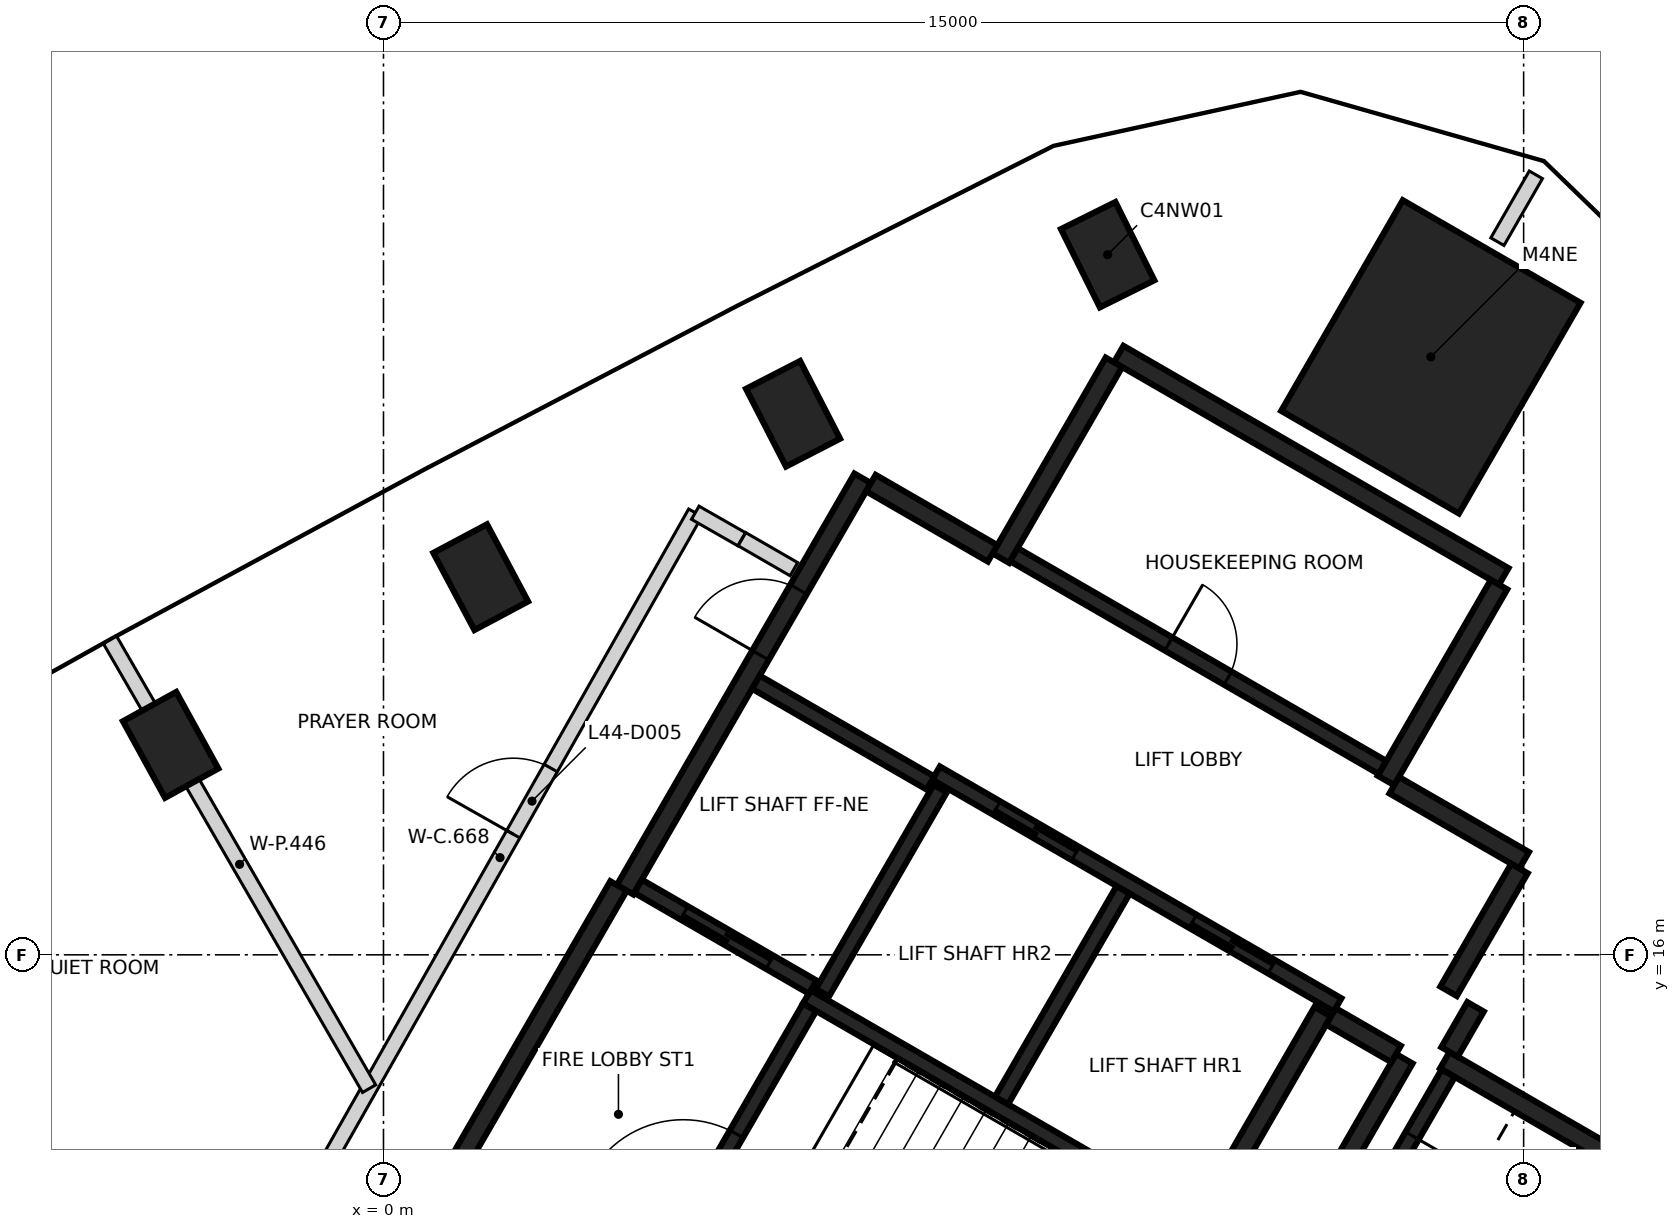
"""IFC4 building model, lengths in metres.
Left out: names, types, materials, properties, quantities, classifications, styles, units other than length and angle.
Written with IfcOpenShell. Run it as: python <this file> out.ifc"""

import sys

from ifc_helpers import new_model, si_unit, direction, frame, frame_2d, origin, origin_2d, place, context, subcontext, project, spatial, rectangle, extrude, element, fill, save


model = new_model("IFC4")
c1 = context("Model", 3, precision=1e-05, world=origin(), true_north=direction((0.0, 1.0)))
c2 = subcontext(c1, "Body", "Model", "MODEL_VIEW")
j1 = project(units=[si_unit("LENGTHUNIT", "METRE"), si_unit("PLANEANGLEUNIT", "RADIAN")], contexts=[c1])
p1 = place(None, origin())
s1 = spatial("IfcSite", under=j1, at=p1, CompositionType="ELEMENT")
p2 = place(p1, origin())
s2 = spatial("IfcBuilding", under=s1, at=p2, CompositionType="ELEMENT")
p3 = place(p2, frame((0.0, 0.0, 179.2)))
s3 = spatial("IfcBuildingStorey", under=s2, at=p3, CompositionType="ELEMENT", Elevation=179.2)
for number, where, z_axis, x_axis in (
    (1, (9.527, 25.211, -0.35), (0.0, 0.0, 1.0), (-0.445, 0.895, 0.0)),
    (2, (5.388, 23.118, -0.35), (0.0, 0.0, 1.0), (-0.458, 0.889, 0.0)),
    (3, (1.279, 20.968, -0.35), (0.0, 0.0, 1.0), (-0.47, 0.883, 0.0)),
    (4, (-2.8, 18.762, -0.35), (0.0, 0.0, 1.0), (-0.482, 0.876, 0.0)),
):
    element("IfcColumn", number, at=place(p3, frame(where, z_axis=z_axis, x_axis=x_axis)), inside=s3, PredefinedType="COLUMN", context=c2, shape_type="SweptSolid", body=[
        extrude(rectangle(XDim=1.15, YDim=0.8, at=origin_2d()), origin(), (0.0, 0.0, 1.0), 3.6),
    ])
p4 = place(p3, frame((13.78, 23.867, -0.35), z_axis=(0.0, 0.0, 1.0), x_axis=(0.5, 0.866025403784, 0.0)))
e5 = element("IfcColumn", 5, at=p4, inside=s3, PredefinedType="COLUMN", context=c2, shape_type="SweptSolid", body=[
    extrude(rectangle(XDim=3.2, YDim=2.7, at=origin_2d()), origin(), (0.0, 0.0, 1.0), 3.6),
])
p5 = place(p3, frame((3.179, 16.856, 0.0), z_axis=(0.0, 0.0, 1.0), x_axis=(0.500004234368, 0.866022959057, 0.0)))
e6 = element("IfcWall", 6, at=p5, inside=s3, PredefinedType="SHEAR", context=c2, shape_type="SweptSolid", body=[
    extrude(rectangle(XDim=6.25, YDim=0.25, at=frame_2d((3.125, 0.0))), origin(), (0.0, 0.0, 1.0), 3.25),
])
p6 = place(p5, frame((3.563, 0.0, 0.0)))
e7 = element("IfcOpeningElement", 7, at=p6, cuts=e6, PredefinedType="OPENING", context=c2, shape_type="SweptSolid", body=[
    extrude(rectangle(XDim=1.0, YDim=2.1, at=frame_2d((0.5, 1.05))), frame((0.0, 0.135, 0.0), z_axis=(0.0, -1.0, 0.0), x_axis=(1.0, 0.0, 0.0)), (0.0, 0.0, 1.0), 0.27),
])
p7 = place(p3, frame((9.673, 23.903, 0.0), z_axis=(0.0, 0.0, 1.0), x_axis=(0.86603616409, -0.499981362141, 0.0)))
e8 = element("IfcWall", 8, at=p7, inside=s3, PredefinedType="SHEAR", context=c2, shape_type="SweptSolid", body=[
    extrude(rectangle(XDim=5.85, YDim=0.25, at=frame_2d((2.925, 0.0))), origin(), (0.0, 0.0, 1.0), 3.25),
])
p8 = place(p3, frame((0.48, 12.381, 0.0), z_axis=(0.0, 0.0, 1.0), x_axis=(0.49999885962, 0.866026062182, 0.0)))
e9 = element("IfcWall", 9, at=p8, inside=s3, PredefinedType="SHEAR", context=c2, shape_type="SweptSolid", body=[
    extrude(rectangle(XDim=5.225, YDim=0.25, at=frame_2d((2.612, 0.0))), origin(), (0.0, 0.0, 1.0), 3.25),
])
p9 = place(p3, frame((12.357, 15.252, 0.0), z_axis=(0.0, 0.0, 1.0), x_axis=(-0.500028443584, -0.866008981251, 0.0)))
e10 = element("IfcWall", 10, at=p9, inside=s3, PredefinedType="SHEAR", context=c2, shape_type="SweptSolid", body=[
    extrude(rectangle(XDim=3.2, YDim=0.25, at=frame_2d((1.6, 0.0))), origin(), (0.0, 0.0, 1.0), 3.25),
])
for number, where, z_axis, x_axis in (
    (11, (8.123, 21.219, 0.0), (0.0, 0.0, 1.0), (0.5, 0.866, 0.0)),
    (12, (14.676, 20.87, 0.0), (0.0, 0.0, 1.0), (-0.5, -0.866, 0.0)),
):
    element("IfcWall", number, at=place(p3, frame(where, z_axis=z_axis, x_axis=x_axis)), inside=s3, PredefinedType="SHEAR", context=c2, shape_type="SweptSolid", body=[
        extrude(rectangle(XDim=2.975, YDim=0.25, at=frame_2d((1.487, 0.0))), origin(), (0.0, 0.0, 1.0), 3.25),
    ])
p10 = place(p3, frame((13.963, 14.614, 0.0), z_axis=(0.0, 0.0, 1.0), x_axis=(0.866042235819, -0.499970844928, 0.0)))
e13 = element("IfcWall", 13, at=p10, inside=s3, PredefinedType="SHEAR", context=c2, shape_type="SweptSolid", body=[
    extrude(rectangle(XDim=2.865, YDim=0.25, at=frame_2d((1.432, 0.0))), origin(), (0.0, 0.0, 1.0), 3.25),
])
p11 = place(p3, frame((11.888, 11.961, 0.0), z_axis=(0.0, 0.0, 1.0), x_axis=(0.500003324108, 0.866023484601, 0.0)))
e14 = element("IfcWall", 14, at=p11, inside=s3, PredefinedType="SHEAR", context=c2, shape_type="SweptSolid", body=[
    extrude(rectangle(XDim=3.085, YDim=0.25, at=frame_2d((1.542, 0.0))), origin(), (0.0, 0.0, 1.0), 3.25),
])
p12 = place(p3, frame((13.297, 18.231, 0.0), z_axis=(0.0, 0.0, 1.0), x_axis=(0.866043531843, -0.499968599967, 0.0)))
e15 = element("IfcWall", 15, at=p12, inside=s3, PredefinedType="SHEAR", context=c2, shape_type="SweptSolid", body=[
    extrude(rectangle(XDim=1.975, YDim=0.25, at=frame_2d((0.987, 0.0))), origin(), (0.0, 0.0, 1.0), 3.25),
])
p13 = place(p3, frame((6.413, 22.206, 0.0), z_axis=(0.0, 0.0, 1.0), x_axis=(0.866016279763, -0.500015802937, 0.0)))
e16 = element("IfcWall", 16, at=p13, inside=s3, PredefinedType="SHEAR", context=c2, shape_type="SweptSolid", body=[
    extrude(rectangle(XDim=1.849, YDim=0.25, at=frame_2d((0.925, 0.0))), origin(), (0.0, 0.0, 1.0), 3.25),
])
p14 = place(p3, frame((14.945, 17.135, 0.0), z_axis=(0.0, 0.0, 1.0), x_axis=(-0.499983108224, -0.866035156036, 0.0)))
e17 = element("IfcWall", 17, at=p14, inside=s3, PredefinedType="SHEAR", context=c2, shape_type="SweptSolid", body=[
    extrude(rectangle(XDim=1.865, YDim=0.25, at=frame_2d((0.932, 0.0))), origin(), (0.0, 0.0, 1.0), 3.25),
])
p15 = place(p3, frame((13.322, 14.695, 0.0), z_axis=(0.0, 0.0, 1.0), x_axis=(-0.866017078145, 0.500014420154, 0.0)))
e18 = element("IfcWall", 18, at=p15, inside=s3, PredefinedType="SHEAR", context=c2, shape_type="SweptSolid", body=[
    extrude(rectangle(XDim=0.989, YDim=0.25, at=frame_2d((0.495, 0.0))), origin(), (0.0, 0.0, 1.0), 3.25),
])
p16 = place(p3, frame((14.368, 15.315, 0.0), z_axis=(0.0, 0.0, 1.0), x_axis=(-0.499897359611, -0.866084655132, 0.0)))
e19 = element("IfcWall", 19, at=p16, inside=s3, PredefinedType="SHEAR", context=c2, shape_type="SweptSolid", body=[
    extrude(rectangle(XDim=0.685, YDim=0.25, at=frame_2d((0.342, 0.0))), origin(), (0.0, 0.0, 1.0), 3.25),
])
p17 = place(p3, frame((12.552, 15.342, 0.0), z_axis=(0.0, 0.0, 1.0), x_axis=(-0.866030299012, 0.499991521122, 0.0)))
e20 = element("IfcWall", 20, at=p17, inside=s3, PredefinedType="SHEAR", context=c2, shape_type="SweptSolid", body=[
    extrude(rectangle(XDim=6.1, YDim=0.2, at=frame_2d((3.05, 0.0))), origin(), (0.0, 0.0, 1.0), 3.25),
])
p18 = place(p17, frame((1.0, 0.0, 0.0)))
e21 = element("IfcOpeningElement", 21, at=p18, cuts=e20, PredefinedType="OPENING", context=c2, shape_type="SweptSolid", body=[
    extrude(rectangle(XDim=1.2, YDim=2.1, at=frame_2d((0.6, 1.05))), frame((0.0, 0.11, 0.0), z_axis=(0.0, -1.0, 0.0), x_axis=(1.0, 0.0, 0.0)), (0.0, 0.0, 1.0), 0.22),
])
p19 = place(p17, frame((3.982, 0.0, 0.0)))
e22 = element("IfcOpeningElement", 22, at=p19, cuts=e20, PredefinedType="OPENING", context=c2, shape_type="SweptSolid", body=[
    extrude(rectangle(XDim=1.2, YDim=2.1, at=frame_2d((0.6, 1.05))), frame((0.0, 0.11, 0.0), z_axis=(0.0, -1.0, 0.0), x_axis=(1.0, 0.0, 0.0)), (0.0, 0.0, 1.0), 0.22),
])
p20 = place(p3, frame((10.636, 12.521, 0.0), z_axis=(0.0, 0.0, 1.0), x_axis=(-0.866013252188, 0.500021046592, 0.0)))
e23 = element("IfcWall", 23, at=p20, inside=s3, PredefinedType="SHEAR", context=c2, shape_type="SweptSolid", body=[
    extrude(rectangle(XDim=5.851, YDim=0.2, at=frame_2d((2.925, 0.0))), origin(), (0.0, 0.0, 1.0), 3.25),
])
p21 = place(p3, frame((8.294, 21.264, 0.0), z_axis=(0.0, 0.0, 1.0), x_axis=(0.866025812541, -0.499999292012, 0.0)))
e24 = element("IfcWall", 24, at=p21, inside=s3, PredefinedType="SHEAR", context=c2, shape_type="SweptSolid", body=[
    extrude(rectangle(XDim=5.598, YDim=0.2, at=frame_2d((2.799, 0.0))), origin(), (0.0, 0.0, 1.0), 3.25),
])
p22 = place(p21, frame((2.349, 0.0, 0.0)))
e25 = element("IfcOpeningElement", 25, at=p22, cuts=e24, PredefinedType="OPENING", context=c2, shape_type="SweptSolid", body=[
    extrude(rectangle(XDim=0.9, YDim=2.1, at=frame_2d((0.45, 1.05))), frame((0.0, 0.11, 0.0), z_axis=(0.0, -1.0, 0.0), x_axis=(1.0, 0.0, 0.0)), (0.0, 0.0, 1.0), 0.22),
])
p23 = place(p3, frame((3.057, 10.895, 0.0), z_axis=(0.0, 0.0, 1.0), x_axis=(0.500027839223, 0.866009330205, 0.0)))
e26 = element("IfcWall", 26, at=p23, inside=s3, PredefinedType="SHEAR", context=c2, shape_type="SweptSolid", body=[
    extrude(rectangle(XDim=5.098, YDim=0.2, at=frame_2d((2.549, 0.0))), origin(), (0.0, 0.0, 1.0), 3.25),
])
p24 = place(p23, frame((1.774, 0.0, 0.0)))
e27 = element("IfcOpeningElement", 27, at=p24, cuts=e26, PredefinedType="OPENING", context=c2, shape_type="SweptSolid", body=[
    extrude(rectangle(XDim=1.4, YDim=2.1, at=frame_2d((0.7, 1.05))), frame((0.0, 0.11, 0.0), z_axis=(0.0, -1.0, 0.0), x_axis=(1.0, 0.0, 0.0)), (0.0, 0.0, 1.0), 0.22),
])
p25 = place(p3, frame((8.132, 14.084, 0.0), z_axis=(0.0, 0.0, 1.0), x_axis=(0.500030834389, 0.86600760081, 0.0)))
e28 = element("IfcWall", 28, at=p25, inside=s3, PredefinedType="SHEAR", context=c2, shape_type="SweptSolid", body=[
    extrude(rectangle(XDim=3.198, YDim=0.2, at=frame_2d((1.599, 0.0))), origin(), (0.0, 0.0, 1.0), 3.25),
])
p26 = place(p3, frame((14.008, 14.442, 0.0), z_axis=(0.0, 0.0, 1.0), x_axis=(-0.499986818241, -0.866033014143, 0.0)))
e29 = element("IfcWall", 29, at=p26, inside=s3, PredefinedType="SHEAR", context=c2, shape_type="SweptSolid", body=[
    extrude(rectangle(XDim=2.798, YDim=0.2, at=frame_2d((1.399, 0.0))), origin(), (0.0, 0.0, 1.0), 3.25),
])
p27 = place(p26, frame((0.949, 0.0, 0.0)))
e30 = element("IfcOpeningElement", 30, at=p27, cuts=e29, PredefinedType="OPENING", context=c2, shape_type="SweptSolid", body=[
    extrude(rectangle(XDim=0.9, YDim=2.1, at=frame_2d((0.45, 1.05))), frame((0.0, 0.11, 0.0), z_axis=(0.0, -1.0, 0.0), x_axis=(1.0, 0.0, 0.0)), (0.0, 0.0, 1.0), 0.22),
])
p28 = place(p3, frame((7.324, 18.187, 0.0), z_axis=(0.0, 0.0, 1.0), x_axis=(-0.499967891604, -0.866043940782, 0.0)))
e31 = element("IfcWall", 31, at=p28, inside=s3, PredefinedType="SHEAR", context=c2, shape_type="SweptSolid", body=[
    extrude(rectangle(XDim=3.1, YDim=0.2, at=frame_2d((1.55, 0.0))), origin(), (0.0, 0.0, 1.0), 3.25),
])
p29 = place(p3, frame((5.646, 15.576, 0.0), z_axis=(0.0, 0.0, 1.0), x_axis=(-0.866018407898, 0.500012117035, 0.0)))
e32 = element("IfcWall", 32, at=p29, inside=s3, PredefinedType="SHEAR", context=c2, shape_type="SweptSolid", body=[
    extrude(rectangle(XDim=2.651, YDim=0.2, at=frame_2d((1.325, 0.0))), origin(), (0.0, 0.0, 1.0), 3.25),
])
p30 = place(p29, frame((0.652, 0.0, 0.0)))
e33 = element("IfcOpeningElement", 33, at=p30, cuts=e32, PredefinedType="OPENING", context=c2, shape_type="SweptSolid", body=[
    extrude(rectangle(XDim=1.3, YDim=2.1, at=frame_2d((0.65, 1.05))), frame((0.0, 0.11, 0.0), z_axis=(0.0, -1.0, 0.0), x_axis=(1.0, 0.0, 0.0)), (0.0, 0.0, 1.0), 0.22),
])
p31 = place(p3, frame((7.196, 18.26, 0.0), z_axis=(0.0, 0.0, 1.0), x_axis=(-0.866018407898, 0.500012117035, 0.0)))
e34 = element("IfcWall", 34, at=p31, inside=s3, PredefinedType="SHEAR", context=c2, shape_type="SweptSolid", body=[
    extrude(rectangle(XDim=2.651, YDim=0.2, at=frame_2d((1.325, 0.0))), origin(), (0.0, 0.0, 1.0), 3.25),
])
p32 = place(p3, frame((-1.035, 12.742, 0.0), z_axis=(0.0, 0.0, 1.0), x_axis=(0.49267817774, 0.870211591039, 0.0)))
e35 = element("IfcWall", 35, at=p32, inside=s3, PredefinedType="PARTITIONING", context=c2, shape_type="SweptSolid", body=[
    extrude(rectangle(XDim=10.427, YDim=0.2, at=frame_2d((5.214, 0.0))), origin(), (0.0, 0.0, 1.0), 3.25),
])
p33 = place(p32, frame((5.568, 0.0, 0.0)))
e36 = element("IfcOpeningElement", 36, at=p33, cuts=e35, PredefinedType="OPENING", context=c2, shape_type="SweptSolid", body=[
    extrude(rectangle(XDim=1.0, YDim=2.1, at=frame_2d((0.5, 1.05))), frame((0.0, 0.11, 0.0), z_axis=(0.0, -1.0, 0.0), x_axis=(1.0, 0.0, 0.0)), (0.0, 0.0, 1.0), 0.22),
])
p34 = place(p3, frame((4.102, 21.816, 0.0), z_axis=(0.0, 0.0, 1.0), x_axis=(0.868007826562, -0.496550514074, 0.0)))
e37 = element("IfcWall", 37, at=p34, inside=s3, PredefinedType="PARTITIONING", context=c2, shape_type="SweptSolid", body=[
    extrude(rectangle(XDim=0.703, YDim=0.2, at=frame_2d((0.351, 0.0))), origin(), (0.0, 0.0, 1.0), 3.25),
])
p35 = place(p3, frame((4.716, 21.468, 0.0), z_axis=(0.0, 0.0, 1.0), x_axis=(0.865912682783, -0.500195187698, 0.0)))
e38 = element("IfcWall", 38, at=p35, inside=s3, PredefinedType="PARTITIONING", context=c2, shape_type="SweptSolid", body=[
    extrude(rectangle(XDim=0.79, YDim=0.2, at=frame_2d((0.395, 0.0))), origin(), (0.0, 0.0, 1.0), 3.25),
])
p36 = place(p3, frame((-7.646, 17.879, 0.0), z_axis=(0.0, 0.0, 1.0), x_axis=(0.500047691386, -0.865997867399, 0.0)))
e39 = element("IfcWall", 39, at=p36, inside=s3, PredefinedType="PARTITIONING", context=c2, shape_type="SweptSolid", body=[
    extrude(rectangle(XDim=11.306, YDim=0.2, at=frame_2d((5.653, 0.0))), origin(), (0.0, 0.0, 1.0), 3.25),
])
p37 = place(p3, frame((-3.598, 20.142, 0.0), z_axis=(0.0, 0.0, 1.0), x_axis=(0.500075890333, -0.865981584047, 0.0)))
e40 = element("IfcWall", 40, at=p37, inside=s3, PredefinedType="PARTITIONING", context=c2, shape_type="SweptSolid", body=[
    extrude(rectangle(XDim=6.816, YDim=0.2, at=frame_2d((3.408, 0.0))), origin(), (0.0, 0.0, 1.0), 3.25),
])
p38 = place(p3, frame((14.655, 25.382, 0.0), z_axis=(0.0, 0.0, 1.0), x_axis=(0.498416889665, 0.866937485691, 0.0)))
e41 = element("IfcWall", 41, at=p38, inside=s3, PredefinedType="PARTITIONING", context=c2, shape_type="SweptSolid", body=[
    extrude(rectangle(XDim=1.015, YDim=0.2, at=frame_2d((0.507, 0.0))), origin(), (0.0, 0.0, 1.0), 3.25),
])
p39 = place(p30, origin())
e42 = element("IfcDoor", 42, at=p39, inside=s3, OperationType="SLIDING_TO_LEFT", PredefinedType="DOOR", context=c2, shape_type="SweptSolid", body=[
    extrude(rectangle(XDim=1.3, YDim=2.1, at=frame_2d((0.65, 1.05))), frame((0.0, 0.025, 0.0), z_axis=(0.0, -1.0, 0.0), x_axis=(1.0, 0.0, 0.0)), (0.0, 0.0, 1.0), 0.05),
])
fill(e33, e42)
p40 = place(p18, origin())
e43 = element("IfcDoor", 43, at=p40, inside=s3, OperationType="DOUBLE_DOOR_SLIDING", PredefinedType="DOOR", context=c2, shape_type="SweptSolid", body=[
    extrude(rectangle(XDim=1.2, YDim=2.1, at=frame_2d((0.6, 1.05))), frame((0.0, 0.025, 0.0), z_axis=(0.0, -1.0, 0.0), x_axis=(1.0, 0.0, 0.0)), (0.0, 0.0, 1.0), 0.05),
])
fill(e21, e43)
p41 = place(p19, origin())
e44 = element("IfcDoor", 44, at=p41, inside=s3, OperationType="DOUBLE_DOOR_SLIDING", PredefinedType="DOOR", context=c2, shape_type="SweptSolid", body=[
    extrude(rectangle(XDim=1.2, YDim=2.1, at=frame_2d((0.6, 1.05))), frame((0.0, 0.025, 0.0), z_axis=(0.0, -1.0, 0.0), x_axis=(1.0, 0.0, 0.0)), (0.0, 0.0, 1.0), 0.05),
])
fill(e22, e44)
p42 = place(p6, origin())
e45 = element("IfcDoor", 45, at=p42, inside=s3, OperationType="SINGLE_SWING_LEFT", PredefinedType="DOOR", context=c2, shape_type="SweptSolid", body=[
    extrude(rectangle(XDim=1.0, YDim=2.1, at=frame_2d((0.5, 1.05))), frame((0.0, 0.025, 0.0), z_axis=(0.0, -1.0, 0.0), x_axis=(1.0, 0.0, 0.0)), (0.0, 0.0, 1.0), 0.05),
])
fill(e7, e45)
p43 = place(p24, origin())
e46 = element("IfcDoor", 46, at=p43, inside=s3, OperationType="SINGLE_SWING_LEFT", PredefinedType="DOOR", context=c2, shape_type="SweptSolid", body=[
    extrude(rectangle(XDim=1.4, YDim=2.1, at=frame_2d((0.7, 1.05))), frame((0.0, 0.025, 0.0), z_axis=(0.0, -1.0, 0.0), x_axis=(1.0, 0.0, 0.0)), (0.0, 0.0, 1.0), 0.05),
])
fill(e27, e46)
p44 = place(p22, origin())
e47 = element("IfcDoor", 47, at=p44, inside=s3, OperationType="SINGLE_SWING_RIGHT", PredefinedType="DOOR", context=c2, shape_type="SweptSolid", body=[
    extrude(rectangle(XDim=0.9, YDim=2.1, at=frame_2d((0.45, 1.05))), frame((0.0, 0.025, 0.0), z_axis=(0.0, -1.0, 0.0), x_axis=(1.0, 0.0, 0.0)), (0.0, 0.0, 1.0), 0.05),
])
fill(e25, e47)
p45 = place(p27, origin())
e48 = element("IfcDoor", 48, at=p45, inside=s3, OperationType="SINGLE_SWING_LEFT", PredefinedType="DOOR", context=c2, shape_type="SweptSolid", body=[
    extrude(rectangle(XDim=0.9, YDim=2.1, at=frame_2d((0.45, 1.05))), frame((0.0, 0.025, 0.0), z_axis=(0.0, -1.0, 0.0), x_axis=(1.0, 0.0, 0.0)), (0.0, 0.0, 1.0), 0.05),
])
fill(e30, e48)
p46 = place(p33, origin())
e49 = element("IfcDoor", 49, at=p46, inside=s3, OperationType="SINGLE_SWING_LEFT", PredefinedType="DOOR", context=c2, shape_type="SweptSolid", body=[
    extrude(rectangle(XDim=1.0, YDim=2.1, at=frame_2d((0.5, 1.05))), frame((0.0, 0.025, 0.0), z_axis=(0.0, -1.0, 0.0), x_axis=(1.0, 0.0, 0.0)), (0.0, 0.0, 1.0), 0.05),
])
fill(e36, e49)
save(model, sys.argv[1])
